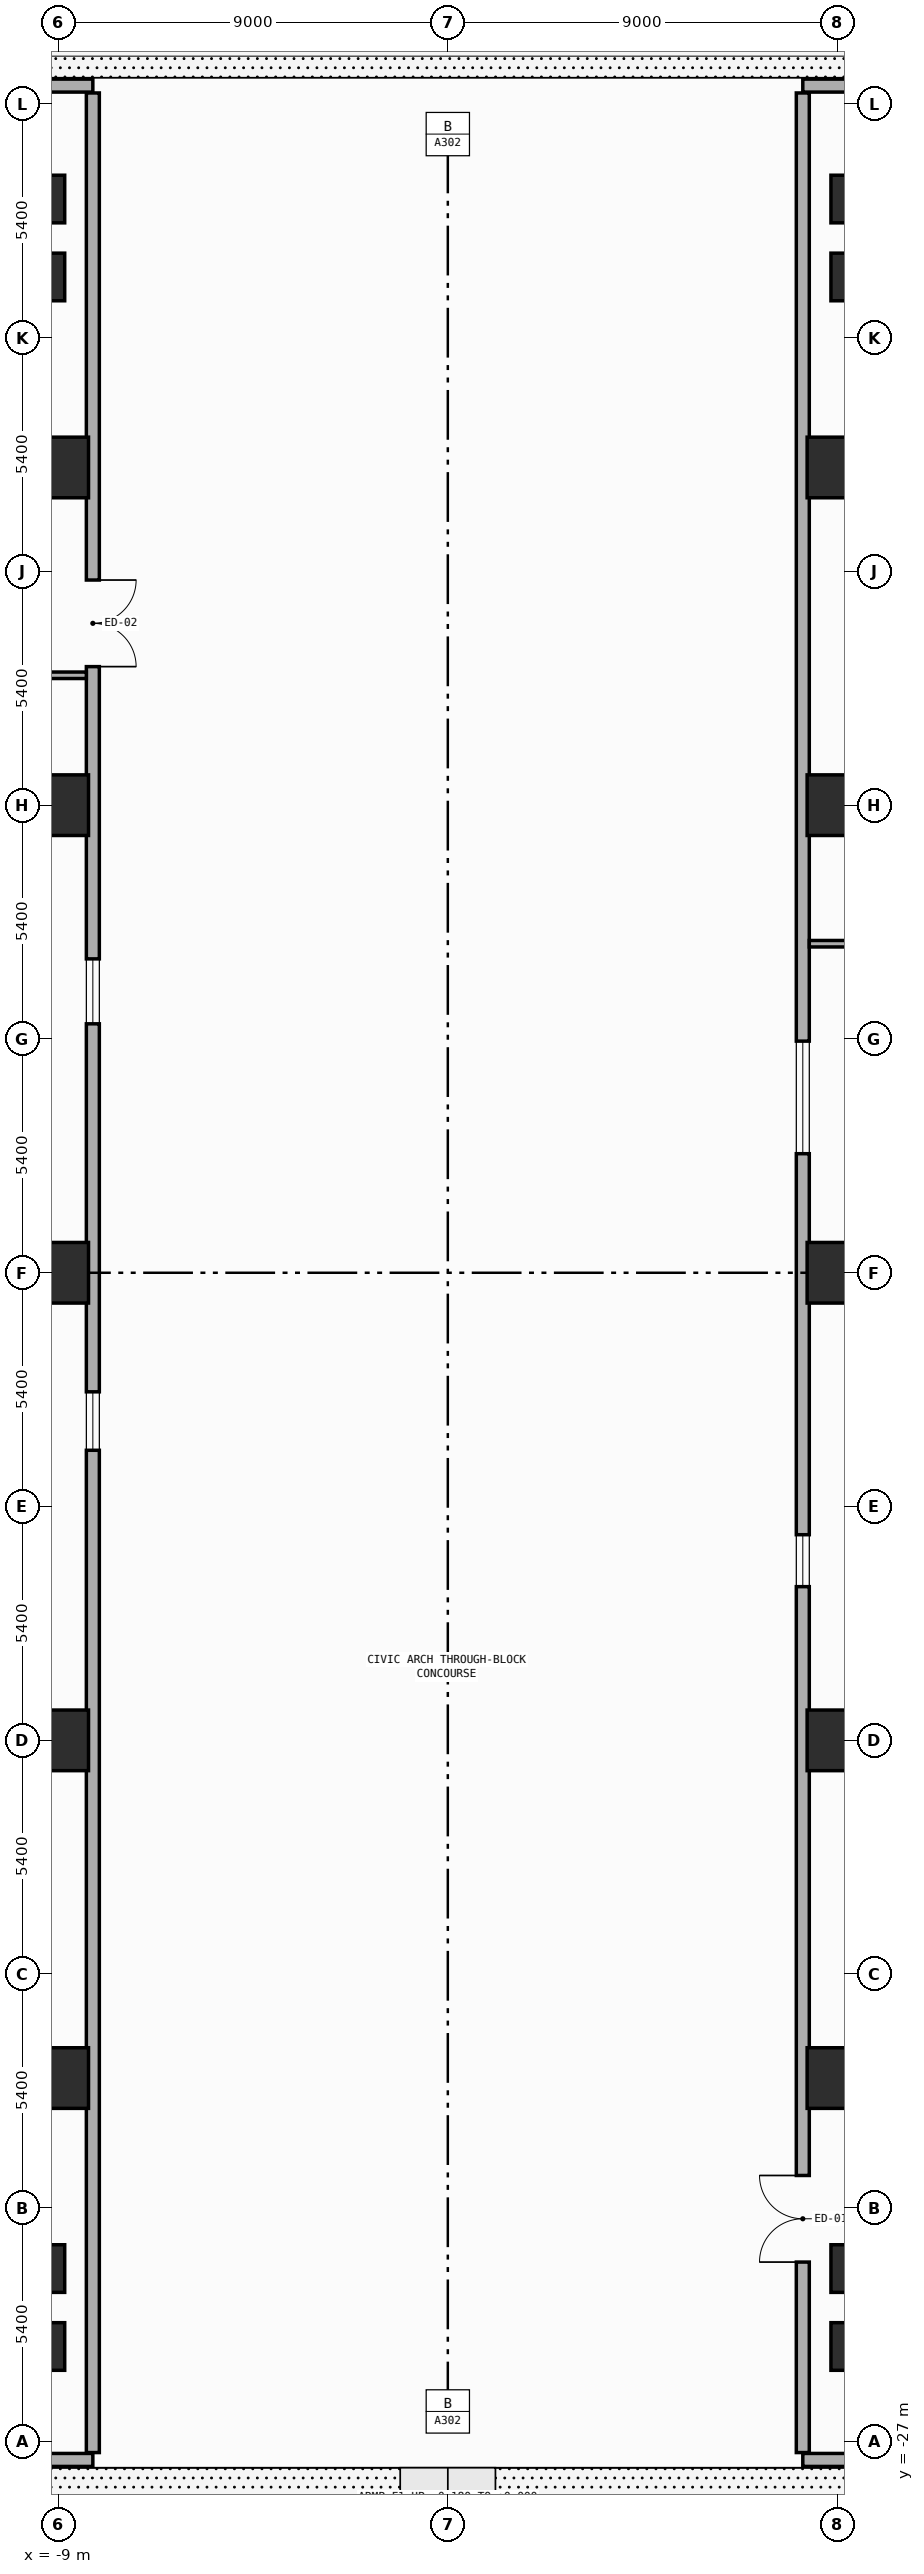
"""IFC4 building model, lengths in metres.
Left out: names, types, materials, properties, quantities, classifications, styles, units other than length and angle.
Written with IfcOpenShell. Run it as: python <this file> out.ifc"""

import sys

from ifc_helpers import new_model, si_unit, direction, frame, frame_2d, origin, origin_2d, place, context, subcontext, project, spatial, rectangle, extrude, element, fill, save


model = new_model("IFC4")
c1 = context("Model", 3, precision=1e-05, world=origin(), true_north=direction((0.0, 1.0)))
c2 = subcontext(c1, "Body", "Model", "MODEL_VIEW")
j1 = project(units=[si_unit("LENGTHUNIT", "METRE"), si_unit("PLANEANGLEUNIT", "RADIAN")], contexts=[c1])
p1 = place(None, origin())
s1 = spatial("IfcSite", under=j1, at=p1, CompositionType="ELEMENT")
p2 = place(p1, origin())
s2 = spatial("IfcBuilding", under=s1, at=p2, CompositionType="ELEMENT")
p3 = place(p2, origin())
s3 = spatial("IfcBuildingStorey", under=s2, at=p3, CompositionType="ELEMENT", Elevation=0.0)
for number, where, z_axis, x_axis in (
    (1, (-9.2, -18.6, 0.0), (0.0, 0.0, 1.0), (1.0, 0.0, 0.0)),
    (2, (-9.2, -10.8, 0.0), (0.0, 0.0, 1.0), (1.0, 0.0, 0.0)),
    (3, (-9.2, 0.0, 0.0), (0.0, 0.0, 1.0), (1.0, 0.0, 0.0)),
    (4, (-9.2, 10.8, 0.0), (0.0, 0.0, 1.0), (1.0, 0.0, 0.0)),
    (5, (-9.2, 18.6, 0.0), (0.0, 0.0, 1.0), (1.0, 0.0, 0.0)),
    (6, (9.2, -18.6, 0.0), (0.0, 0.0, 1.0), (1.0, 0.0, 0.0)),
    (7, (9.2, -10.8, 0.0), (0.0, 0.0, 1.0), (1.0, 0.0, 0.0)),
    (8, (9.2, 0.0, 0.0), (0.0, 0.0, 1.0), (1.0, 0.0, 0.0)),
    (9, (9.2, 10.8, 0.0), (0.0, 0.0, 1.0), (1.0, 0.0, 0.0)),
    (10, (9.2, 18.6, 0.0), (0.0, 0.0, 1.0), (1.0, 0.0, 0.0)),
):
    element("IfcColumn", number, at=place(p3, frame(where, z_axis=z_axis, x_axis=x_axis)), inside=s3, PredefinedType="COLUMN", context=c2, shape_type="SweptSolid", body=[
        extrude(rectangle(XDim=1.8, YDim=1.4, at=origin_2d()), origin(), (0.0, 0.0, 1.0), 6.0),
    ])
for number, where, z_axis, x_axis in (
    (11, (-9.2, -24.8, 0.0), (0.0, 0.0, 1.0), (1.0, 0.0, 0.0)),
    (12, (-9.2, 24.8, 0.0), (0.0, 0.0, 1.0), (1.0, 0.0, 0.0)),
    (13, (9.2, -24.8, 0.0), (0.0, 0.0, 1.0), (1.0, 0.0, 0.0)),
    (14, (9.2, 24.8, 0.0), (0.0, 0.0, 1.0), (1.0, 0.0, 0.0)),
    (15, (-9.2, -23.0, 0.0), (0.0, 0.0, 1.0), (1.0, 0.0, 0.0)),
    (16, (-9.2, 23.0, 0.0), (0.0, 0.0, 1.0), (1.0, 0.0, 0.0)),
    (17, (9.2, -23.0, 0.0), (0.0, 0.0, 1.0), (1.0, 0.0, 0.0)),
    (18, (9.2, 23.0, 0.0), (0.0, 0.0, 1.0), (1.0, 0.0, 0.0)),
):
    element("IfcColumn", number, at=place(p3, frame(where, z_axis=z_axis, x_axis=x_axis)), inside=s3, PredefinedType="PILASTER", context=c2, shape_type="SweptSolid", body=[
        extrude(rectangle(XDim=0.7, YDim=1.1, at=origin_2d()), origin(), (0.0, 0.0, 1.0), 6.0),
    ])
p4 = place(p3, frame((-8.2, -27.42, 0.0), z_axis=(0.0, 0.0, 1.0), x_axis=(-1.0, 0.0, 0.0)))
e19 = element("IfcWall", 19, at=p4, inside=s3, PredefinedType="STANDARD", context=c2, shape_type="SweptSolid", body=[
    extrude(rectangle(XDim=26.4, YDim=0.3, at=frame_2d((13.2, 0.0))), origin(), (0.0, 0.0, 1.0), 5.7),
])
p5 = place(p4, frame((22.9, 0.0, 0.0)))
e20 = element("IfcOpeningElement", 20, at=p5, cuts=e19, PredefinedType="OPENING", context=c2, shape_type="SweptSolid", body=[
    extrude(rectangle(XDim=2.0, YDim=2.4, at=frame_2d((1.0, 1.2))), frame((0.0, 0.16, 0.0), z_axis=(0.0, -1.0, 0.0), x_axis=(1.0, 0.0, 0.0)), (0.0, 0.0, 1.0), 0.32),
])
p6 = place(p4, frame((4.5, 0.0, 0.85)))
e21 = element("IfcOpeningElement", 21, at=p6, cuts=e19, PredefinedType="OPENING", context=c2, shape_type="SweptSolid", body=[
    extrude(rectangle(XDim=2.4, YDim=2.5, at=frame_2d((1.2, 1.25))), frame((0.0, 0.16, 0.0), z_axis=(0.0, -1.0, 0.0), x_axis=(1.0, 0.0, 0.0)), (0.0, 0.0, 1.0), 0.32),
])
p7 = place(p4, frame((11.5, 0.0, 0.85)))
e22 = element("IfcOpeningElement", 22, at=p7, cuts=e19, PredefinedType="OPENING", context=c2, shape_type="SweptSolid", body=[
    extrude(rectangle(XDim=2.1, YDim=2.0, at=frame_2d((1.05, 1.0))), frame((0.0, 0.16, 0.0), z_axis=(0.0, -1.0, 0.0), x_axis=(1.0, 0.0, 0.0)), (0.0, 0.0, 1.0), 0.32),
])
p8 = place(p3, frame((-34.6, 27.42, 0.0), z_axis=(0.0, 0.0, 1.0), x_axis=(1.0, 0.0, 0.0)))
e23 = element("IfcWall", 23, at=p8, inside=s3, PredefinedType="STANDARD", context=c2, shape_type="SweptSolid", body=[
    extrude(rectangle(XDim=26.4, YDim=0.3, at=frame_2d((13.2, 0.0))), origin(), (0.0, 0.0, 1.0), 5.7),
])
p9 = place(p8, frame((22.3, 0.0, 0.0)))
e24 = element("IfcOpeningElement", 24, at=p9, cuts=e23, PredefinedType="OPENING", context=c2, shape_type="SweptSolid", body=[
    extrude(rectangle(XDim=1.8, YDim=2.4, at=frame_2d((0.9, 1.2))), frame((0.0, 0.16, 0.0), z_axis=(0.0, -1.0, 0.0), x_axis=(1.0, 0.0, 0.0)), (0.0, 0.0, 1.0), 0.32),
])
p10 = place(p8, frame((5.7, 0.0, 0.0)))
e25 = element("IfcOpeningElement", 25, at=p10, cuts=e23, PredefinedType="OPENING", context=c2, shape_type="SweptSolid", body=[
    extrude(rectangle(XDim=4.2, YDim=3.4, at=frame_2d((2.1, 1.7))), frame((0.0, 0.16, 0.0), z_axis=(0.0, -1.0, 0.0), x_axis=(1.0, 0.0, 0.0)), (0.0, 0.0, 1.0), 0.32),
])
p11 = place(p8, frame((12.2, 0.0, 0.85)))
e26 = element("IfcOpeningElement", 26, at=p11, cuts=e23, PredefinedType="OPENING", context=c2, shape_type="SweptSolid", body=[
    extrude(rectangle(XDim=1.8, YDim=1.9, at=frame_2d((0.9, 0.95))), frame((0.0, 0.16, 0.0), z_axis=(0.0, -1.0, 0.0), x_axis=(1.0, 0.0, 0.0)), (0.0, 0.0, 1.0), 0.32),
])
p12 = place(p8, frame((17.5, 0.0, 0.85)))
e27 = element("IfcOpeningElement", 27, at=p12, cuts=e23, PredefinedType="OPENING", context=c2, shape_type="SweptSolid", body=[
    extrude(rectangle(XDim=1.6, YDim=1.85, at=frame_2d((0.8, 0.925))), frame((0.0, 0.16, 0.0), z_axis=(0.0, -1.0, 0.0), x_axis=(1.0, 0.0, 0.0)), (0.0, 0.0, 1.0), 0.32),
])
p13 = place(p3, frame((-8.2, 27.25, 0.0), z_axis=(0.0, 0.0, 1.0), x_axis=(0.0, -1.0, 0.0)))
e28 = element("IfcWall", 28, at=p13, inside=s3, PredefinedType="STANDARD", context=c2, shape_type="SweptSolid", body=[
    extrude(rectangle(XDim=54.5, YDim=0.3, at=frame_2d((27.25, 0.0))), origin(), (0.0, 0.0, 1.0), 5.7),
])
p14 = place(p13, frame((11.25, 0.0, 0.0)))
e29 = element("IfcOpeningElement", 29, at=p14, cuts=e28, PredefinedType="OPENING", context=c2, shape_type="SweptSolid", body=[
    extrude(rectangle(XDim=2.0, YDim=2.4, at=frame_2d((1.0, 1.2))), frame((0.0, 0.16, 0.0), z_axis=(0.0, -1.0, 0.0), x_axis=(1.0, 0.0, 0.0)), (0.0, 0.0, 1.0), 0.32),
])
p15 = place(p13, frame((20.0, 0.0, 0.85)))
e30 = element("IfcOpeningElement", 30, at=p15, cuts=e28, PredefinedType="OPENING", context=c2, shape_type="SweptSolid", body=[
    extrude(rectangle(XDim=1.5, YDim=1.8, at=frame_2d((0.75, 0.9))), frame((0.0, 0.16, 0.0), z_axis=(0.0, -1.0, 0.0), x_axis=(1.0, 0.0, 0.0)), (0.0, 0.0, 1.0), 0.32),
])
p16 = place(p13, frame((30.0, 0.0, 0.85)))
e31 = element("IfcOpeningElement", 31, at=p16, cuts=e28, PredefinedType="OPENING", context=c2, shape_type="SweptSolid", body=[
    extrude(rectangle(XDim=1.35, YDim=1.75, at=frame_2d((0.675, 0.875))), frame((0.0, 0.16, 0.0), z_axis=(0.0, -1.0, 0.0), x_axis=(1.0, 0.0, 0.0)), (0.0, 0.0, 1.0), 0.32),
])
p17 = place(p3, frame((34.6, -27.42, 0.0), z_axis=(0.0, 0.0, 1.0), x_axis=(-1.0, 0.0, 0.0)))
e32 = element("IfcWall", 32, at=p17, inside=s3, PredefinedType="STANDARD", context=c2, shape_type="SweptSolid", body=[
    extrude(rectangle(XDim=26.4, YDim=0.3, at=frame_2d((13.2, 0.0))), origin(), (0.0, 0.0, 1.0), 5.7),
])
p18 = place(p17, frame((1.5, 0.0, 0.0)))
e33 = element("IfcOpeningElement", 33, at=p18, cuts=e32, PredefinedType="OPENING", context=c2, shape_type="SweptSolid", body=[
    extrude(rectangle(XDim=2.0, YDim=2.4, at=frame_2d((1.0, 1.2))), frame((0.0, 0.16, 0.0), z_axis=(0.0, -1.0, 0.0), x_axis=(1.0, 0.0, 0.0)), (0.0, 0.0, 1.0), 0.32),
])
p19 = place(p17, frame((5.2, 0.0, 0.0)))
e34 = element("IfcOpeningElement", 34, at=p19, cuts=e32, PredefinedType="OPENING", context=c2, shape_type="SweptSolid", body=[
    extrude(rectangle(XDim=1.1, YDim=2.2, at=frame_2d((0.55, 1.1))), frame((0.0, 0.16, 0.0), z_axis=(0.0, -1.0, 0.0), x_axis=(1.0, 0.0, 0.0)), (0.0, 0.0, 1.0), 0.32),
])
p20 = place(p3, frame((8.2, 27.42, 0.0), z_axis=(0.0, 0.0, 1.0), x_axis=(1.0, 0.0, 0.0)))
e35 = element("IfcWall", 35, at=p20, inside=s3, PredefinedType="STANDARD", context=c2, shape_type="SweptSolid", body=[
    extrude(rectangle(XDim=26.4, YDim=0.3, at=frame_2d((13.2, 0.0))), origin(), (0.0, 0.0, 1.0), 5.7),
])
p21 = place(p20, frame((3.6, 0.0, 0.0)))
e36 = element("IfcOpeningElement", 36, at=p21, cuts=e35, PredefinedType="OPENING", context=c2, shape_type="SweptSolid", body=[
    extrude(rectangle(XDim=1.8, YDim=2.4, at=frame_2d((0.9, 1.2))), frame((0.0, 0.16, 0.0), z_axis=(0.0, -1.0, 0.0), x_axis=(1.0, 0.0, 0.0)), (0.0, 0.0, 1.0), 0.32),
])
p22 = place(p20, frame((8.5, 0.0, 0.85)))
e37 = element("IfcOpeningElement", 37, at=p22, cuts=e35, PredefinedType="OPENING", context=c2, shape_type="SweptSolid", body=[
    extrude(rectangle(XDim=1.8, YDim=1.9, at=frame_2d((0.9, 0.95))), frame((0.0, 0.16, 0.0), z_axis=(0.0, -1.0, 0.0), x_axis=(1.0, 0.0, 0.0)), (0.0, 0.0, 1.0), 0.32),
])
p23 = place(p20, frame((14.5, 0.0, 0.85)))
e38 = element("IfcOpeningElement", 38, at=p23, cuts=e35, PredefinedType="OPENING", context=c2, shape_type="SweptSolid", body=[
    extrude(rectangle(XDim=1.6, YDim=1.85, at=frame_2d((0.8, 0.925))), frame((0.0, 0.16, 0.0), z_axis=(0.0, -1.0, 0.0), x_axis=(1.0, 0.0, 0.0)), (0.0, 0.0, 1.0), 0.32),
])
p24 = place(p3, frame((8.2, -27.25, 0.0), z_axis=(0.0, 0.0, 1.0), x_axis=(0.0, 1.0, 0.0)))
e39 = element("IfcWall", 39, at=p24, inside=s3, PredefinedType="STANDARD", context=c2, shape_type="SweptSolid", body=[
    extrude(rectangle(XDim=54.5, YDim=0.3, at=frame_2d((27.25, 0.0))), origin(), (0.0, 0.0, 1.0), 5.7),
])
p25 = place(p24, frame((4.4, 0.0, 0.0)))
e40 = element("IfcOpeningElement", 40, at=p25, cuts=e39, PredefinedType="OPENING", context=c2, shape_type="SweptSolid", body=[
    extrude(rectangle(XDim=2.0, YDim=2.4, at=frame_2d((1.0, 1.2))), frame((0.0, 0.16, 0.0), z_axis=(0.0, -1.0, 0.0), x_axis=(1.0, 0.0, 0.0)), (0.0, 0.0, 1.0), 0.32),
])
p26 = place(p24, frame((20.0, 0.0, 0.85)))
e41 = element("IfcOpeningElement", 41, at=p26, cuts=e39, PredefinedType="OPENING", context=c2, shape_type="SweptSolid", body=[
    extrude(rectangle(XDim=1.2, YDim=1.65, at=frame_2d((0.6, 0.825))), frame((0.0, 0.16, 0.0), z_axis=(0.0, -1.0, 0.0), x_axis=(1.0, 0.0, 0.0)), (0.0, 0.0, 1.0), 0.32),
])
p27 = place(p24, frame((30.0, 0.0, 0.85)))
e42 = element("IfcOpeningElement", 42, at=p27, cuts=e39, PredefinedType="OPENING", context=c2, shape_type="SweptSolid", body=[
    extrude(rectangle(XDim=2.6, YDim=1.95, at=frame_2d((1.3, 0.975))), frame((0.0, 0.16, 0.0), z_axis=(0.0, -1.0, 0.0), x_axis=(1.0, 0.0, 0.0)), (0.0, 0.0, 1.0), 0.32),
])
p28 = place(p3, frame((-12.0, 13.8, 0.0), z_axis=(0.0, 0.0, 1.0), x_axis=(1.0, 0.0, 0.0)))
e43 = element("IfcWall", 43, at=p28, inside=s3, PredefinedType="PARTITIONING", context=c2, shape_type="SweptSolid", body=[
    extrude(rectangle(XDim=3.65, YDim=0.15, at=frame_2d((1.825, 0.0))), origin(), (0.0, 0.0, 1.0), 5.7),
])
p29 = place(p28, frame((0.55, 0.0, 0.0)))
e44 = element("IfcOpeningElement", 44, at=p29, cuts=e43, PredefinedType="OPENING", context=c2, shape_type="SweptSolid", body=[
    extrude(rectangle(XDim=1.15, YDim=2.2, at=frame_2d((0.575, 1.1))), frame((0.0, 0.085, 0.0), z_axis=(0.0, -1.0, 0.0), x_axis=(1.0, 0.0, 0.0)), (0.0, 0.0, 1.0), 0.17),
])
p30 = place(p3, frame((8.35, 7.6, 0.0), z_axis=(0.0, 0.0, 1.0), x_axis=(1.0, 0.0, 0.0)))
e45 = element("IfcWall", 45, at=p30, inside=s3, PredefinedType="PARTITIONING", context=c2, shape_type="SweptSolid", body=[
    extrude(rectangle(XDim=3.65, YDim=0.15, at=frame_2d((1.825, 0.0))), origin(), (0.0, 0.0, 1.0), 5.7),
])
p31 = place(p30, frame((1.95, 0.0, 0.0)))
e46 = element("IfcOpeningElement", 46, at=p31, cuts=e45, PredefinedType="OPENING", context=c2, shape_type="SweptSolid", body=[
    extrude(rectangle(XDim=1.15, YDim=2.2, at=frame_2d((0.575, 1.1))), frame((0.0, 0.085, 0.0), z_axis=(0.0, -1.0, 0.0), x_axis=(1.0, 0.0, 0.0)), (0.0, 0.0, 1.0), 0.17),
])
p32 = place(p25, origin())
e47 = element("IfcDoor", 47, at=p32, inside=s3, OperationType="DOUBLE_DOOR_SINGLE_SWING", PredefinedType="DOOR", context=c2, shape_type="SweptSolid", body=[
    extrude(rectangle(XDim=2.0, YDim=2.4, at=frame_2d((1.0, 1.2))), frame((0.0, 0.025, 0.0), z_axis=(0.0, -1.0, 0.0), x_axis=(1.0, 0.0, 0.0)), (0.0, 0.0, 1.0), 0.05),
])
fill(e40, e47)
p33 = place(p14, origin())
e48 = element("IfcDoor", 48, at=p33, inside=s3, OperationType="DOUBLE_DOOR_SINGLE_SWING", PredefinedType="DOOR", context=c2, shape_type="SweptSolid", body=[
    extrude(rectangle(XDim=2.0, YDim=2.4, at=frame_2d((1.0, 1.2))), frame((0.0, 0.025, 0.0), z_axis=(0.0, -1.0, 0.0), x_axis=(1.0, 0.0, 0.0)), (0.0, 0.0, 1.0), 0.05),
])
fill(e29, e48)
p34 = place(p15, origin())
e49 = element("IfcWindow", 49, at=p34, inside=s3, PartitioningType="SINGLE_PANEL", PredefinedType="WINDOW", context=c2, shape_type="SweptSolid", body=[
    extrude(rectangle(XDim=1.5, YDim=1.8, at=frame_2d((0.75, 0.9))), frame((0.0, 0.03, 0.0), z_axis=(0.0, -1.0, 0.0), x_axis=(1.0, 0.0, 0.0)), (0.0, 0.0, 1.0), 0.06),
])
fill(e30, e49)
p35 = place(p16, origin())
e50 = element("IfcWindow", 50, at=p35, inside=s3, PartitioningType="SINGLE_PANEL", PredefinedType="WINDOW", context=c2, shape_type="SweptSolid", body=[
    extrude(rectangle(XDim=1.35, YDim=1.75, at=frame_2d((0.675, 0.875))), frame((0.0, 0.03, 0.0), z_axis=(0.0, -1.0, 0.0), x_axis=(1.0, 0.0, 0.0)), (0.0, 0.0, 1.0), 0.06),
])
fill(e31, e50)
p36 = place(p26, origin())
e51 = element("IfcWindow", 51, at=p36, inside=s3, PartitioningType="SINGLE_PANEL", PredefinedType="WINDOW", context=c2, shape_type="SweptSolid", body=[
    extrude(rectangle(XDim=1.2, YDim=1.65, at=frame_2d((0.6, 0.825))), frame((0.0, 0.03, 0.0), z_axis=(0.0, -1.0, 0.0), x_axis=(1.0, 0.0, 0.0)), (0.0, 0.0, 1.0), 0.06),
])
fill(e41, e51)
p37 = place(p27, origin())
e52 = element("IfcWindow", 52, at=p37, inside=s3, PartitioningType="SINGLE_PANEL", PredefinedType="WINDOW", context=c2, shape_type="SweptSolid", body=[
    extrude(rectangle(XDim=2.6, YDim=1.95, at=frame_2d((1.3, 0.975))), frame((0.0, 0.03, 0.0), z_axis=(0.0, -1.0, 0.0), x_axis=(1.0, 0.0, 0.0)), (0.0, 0.0, 1.0), 0.06),
])
fill(e42, e52)
save(model, sys.argv[1])
